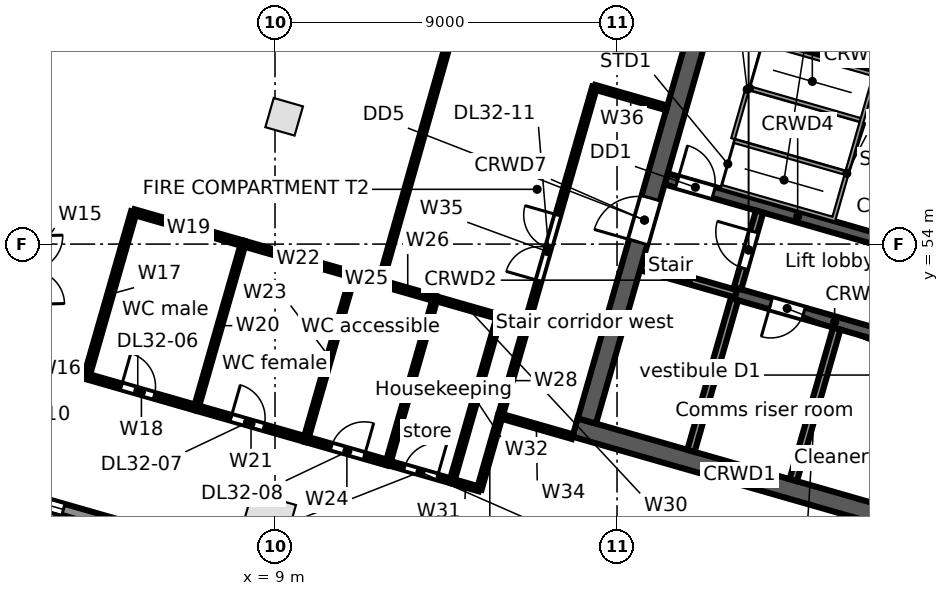
"""IFC4 building model, lengths in metres.
Left out: names, types, materials, properties, quantities, classifications, styles, units other than length and angle.
Written with IfcOpenShell. Run it as: python <this file> out.ifc"""

import sys

from ifc_helpers import new_model, si_unit, direction, frame, frame_2d, origin, origin_2d, place, context, subcontext, project, spatial, rectangle, extrude, element, fill, save


model = new_model("IFC4")
c1 = context("Model", 3, precision=1e-05, world=origin(), true_north=direction((0.0, 1.0)))
c2 = subcontext(c1, "Body", "Model", "MODEL_VIEW")
j1 = project(units=[si_unit("LENGTHUNIT", "METRE"), si_unit("PLANEANGLEUNIT", "RADIAN")], contexts=[c1])
p1 = place(None, origin())
s1 = spatial("IfcSite", under=j1, at=p1, CompositionType="ELEMENT")
p2 = place(p1, origin())
s2 = spatial("IfcBuilding", under=s1, at=p2, CompositionType="ELEMENT")
p3 = place(p2, frame((0.0, 0.0, 158.9)))
s3 = spatial("IfcBuildingStorey", under=s2, at=p3, CompositionType="ELEMENT", Elevation=158.9)
p4 = place(p3, frame((8.81, 46.722, 0.0), z_axis=(0.0, 0.0, 1.0), x_axis=(0.961261695938, -0.275637355817, 0.0)))
e1 = element("IfcColumn", 1, at=p4, inside=s3, PredefinedType="COLUMN", context=c2, shape_type="SweptSolid", body=[
    extrude(rectangle(XDim=1.2, YDim=1.2, at=origin_2d()), origin(), (0.0, 0.0, 1.0), 4.0),
])
p5 = place(p3, frame((9.241, 57.35, 0.0), z_axis=(0.0, 0.0, 1.0), x_axis=(0.961261695938, -0.275637355817, 0.0)))
e2 = element("IfcColumn", 2, at=p5, inside=s3, PredefinedType="COLUMN", context=c2, shape_type="SweptSolid", body=[
    extrude(rectangle(XDim=0.8, YDim=0.8, at=origin_2d()), origin(), (0.0, 0.0, 1.0), 4.0),
])
p6 = place(p3, frame((24.042, 41.106, 0.0), z_axis=(0.0, 0.0, 1.0), x_axis=(-0.961261693976, 0.275637362661, 0.0)))
e3 = element("IfcWall", 3, at=p6, inside=s3, PredefinedType="STANDARD", context=c2, shape_type="SweptSolid", body=[
    extrude(rectangle(XDim=24.948, YDim=0.3, at=frame_2d((12.474, 0.0))), origin(), (0.0, 0.0, 1.0), 3.68),
])
p7 = place(p6, frame((21.441, 0.0, 0.6)))
e4 = element("IfcOpeningElement", 4, at=p7, cuts=e3, PredefinedType="OPENING", context=c2, shape_type="SweptSolid", body=[
    extrude(rectangle(XDim=0.9, YDim=2.4, at=frame_2d((0.45, 1.2))), frame((0.0, 0.16, 0.0), z_axis=(0.0, -1.0, 0.0), x_axis=(1.0, 0.0, 0.0)), (0.0, 0.0, 1.0), 0.32),
])
p8 = place(p6, frame((13.121, 0.0, 0.6)))
e5 = element("IfcOpeningElement", 5, at=p8, cuts=e3, PredefinedType="OPENING", context=c2, shape_type="SweptSolid", body=[
    extrude(rectangle(XDim=0.9, YDim=2.4, at=frame_2d((0.45, 1.2))), frame((0.0, 0.16, 0.0), z_axis=(0.0, -1.0, 0.0), x_axis=(1.0, 0.0, 0.0)), (0.0, 0.0, 1.0), 0.32),
])
p9 = place(p6, frame((10.591, 0.0, 0.0)))
e6 = element("IfcOpeningElement", 6, at=p9, cuts=e3, PredefinedType="OPENING", context=c2, shape_type="SweptSolid", body=[
    extrude(rectangle(XDim=1.8, YDim=2.4, at=frame_2d((0.9, 1.2))), frame((0.0, 0.16, 0.0), z_axis=(0.0, -1.0, 0.0), x_axis=(1.0, 0.0, 0.0)), (0.0, 0.0, 1.0), 0.32),
])
p10 = place(p6, frame((4.8, 0.0, 0.6)))
e7 = element("IfcOpeningElement", 7, at=p10, cuts=e3, PredefinedType="OPENING", context=c2, shape_type="SweptSolid", body=[
    extrude(rectangle(XDim=0.9, YDim=2.4, at=frame_2d((0.45, 1.2))), frame((0.0, 0.16, 0.0), z_axis=(0.0, -1.0, 0.0), x_axis=(1.0, 0.0, 0.0)), (0.0, 0.0, 1.0), 0.32),
])
p11 = place(p6, frame((2.27, 0.0, 0.0)))
e8 = element("IfcOpeningElement", 8, at=p11, cuts=e3, PredefinedType="OPENING", context=c2, shape_type="SweptSolid", body=[
    extrude(rectangle(XDim=1.8, YDim=2.4, at=frame_2d((0.9, 1.2))), frame((0.0, 0.16, 0.0), z_axis=(0.0, -1.0, 0.0), x_axis=(1.0, 0.0, 0.0)), (0.0, 0.0, 1.0), 0.32),
])
p12 = place(p3, frame((16.897, 49.173, 0.0), z_axis=(0.0, 0.0, 1.0), x_axis=(0.96126248289, -0.275634611374, 0.0)))
e9 = element("IfcWall", 9, at=p12, inside=s3, PredefinedType="SOLIDWALL", context=c2, shape_type="SweptSolid", body=[
    extrude(rectangle(XDim=9.0, YDim=0.5, at=frame_2d((4.5, 0.0))), origin(), (0.0, 0.0, 1.0), 3.68),
])
p13 = place(p3, frame((18.632, 53.409, 0.0), z_axis=(0.0, 0.0, 1.0), x_axis=(0.961247078216, -0.275688328772, 0.0)))
e10 = element("IfcWall", 10, at=p13, inside=s3, PredefinedType="SOLIDWALL", context=c2, shape_type="SweptSolid", body=[
    extrude(rectangle(XDim=2.6, YDim=0.2, at=frame_2d((1.3, 0.0))), origin(), (0.0, 0.0, 1.0), 3.68),
])
p14 = place(p3, frame((21.131, 52.692, 0.0), z_axis=(0.0, 0.0, 1.0), x_axis=(0.961271043721, -0.27560475414, 0.0)))
e11 = element("IfcWall", 11, at=p14, inside=s3, PredefinedType="SOLIDWALL", context=c2, shape_type="SweptSolid", body=[
    extrude(rectangle(XDim=5.4, YDim=0.3, at=frame_2d((2.7, 0.0))), origin(), (0.0, 0.0, 1.0), 3.68),
])
p15 = place(p14, frame((0.95, 0.0, 0.0)))
e12 = element("IfcOpeningElement", 12, at=p15, cuts=e11, PredefinedType="OPENING", context=c2, shape_type="SweptSolid", body=[
    extrude(rectangle(XDim=0.9, YDim=2.1, at=frame_2d((0.45, 1.05))), frame((0.0, 0.16, 0.0), z_axis=(0.0, -1.0, 0.0), x_axis=(1.0, 0.0, 0.0)), (0.0, 0.0, 1.0), 0.32),
])
p16 = place(p14, frame((3.75, 0.0, 0.0)))
e13 = element("IfcOpeningElement", 13, at=p16, cuts=e11, PredefinedType="OPENING", context=c2, shape_type="SweptSolid", body=[
    extrude(rectangle(XDim=0.9, YDim=2.1, at=frame_2d((0.45, 1.05))), frame((0.0, 0.16, 0.0), z_axis=(0.0, -1.0, 0.0), x_axis=(1.0, 0.0, 0.0)), (0.0, 0.0, 1.0), 0.32),
])
p17 = place(p3, frame((19.293, 55.716, 0.0), z_axis=(0.0, 0.0, 1.0), x_axis=(0.96125862491, -0.275648065539, 0.0)))
e14 = element("IfcWall", 14, at=p17, inside=s3, PredefinedType="SOLIDWALL", context=c2, shape_type="SweptSolid", body=[
    extrude(rectangle(XDim=7.2, YDim=0.3, at=frame_2d((3.6, 0.0))), origin(), (0.0, 0.0, 1.0), 3.68),
])
p18 = place(p17, frame((0.3, 0.0, 0.0)))
e15 = element("IfcOpeningElement", 15, at=p18, cuts=e14, PredefinedType="OPENING", context=c2, shape_type="SweptSolid", body=[
    extrude(rectangle(XDim=1.0, YDim=2.1, at=frame_2d((0.5, 1.05))), frame((0.0, 0.16, 0.0), z_axis=(0.0, -1.0, 0.0), x_axis=(1.0, 0.0, 0.0)), (0.0, 0.0, 1.0), 0.32),
])
p19 = place(p3, frame((20.067, 60.228, 0.0), z_axis=(0.0, 0.0, 1.0), x_axis=(0.96126248289, -0.275634611374, 0.0)))
e16 = element("IfcWall", 16, at=p19, inside=s3, PredefinedType="SOLIDWALL", context=c2, shape_type="SweptSolid", body=[
    extrude(rectangle(XDim=9.0, YDim=0.5, at=frame_2d((4.5, 0.0))), origin(), (0.0, 0.0, 1.0), 3.68),
])
p20 = place(p3, frame((17.206, 49.344, 0.0), z_axis=(0.0, 0.0, 1.0), x_axis=(0.275632651182, 0.961263044958, 0.0)))
e17 = element("IfcWall", 17, at=p20, inside=s3, PredefinedType="SOLIDWALL", context=c2, shape_type="SweptSolid", body=[
    extrude(rectangle(XDim=11.0, YDim=0.5, at=frame_2d((5.5, 0.0))), origin(), (0.0, 0.0, 1.0), 3.68),
])
p21 = place(p20, frame((4.9, 0.0, 0.0)))
e18 = element("IfcOpeningElement", 18, at=p21, cuts=e17, PredefinedType="OPENING", context=c2, shape_type="SweptSolid", body=[
    extrude(rectangle(XDim=1.2, YDim=2.1, at=frame_2d((0.6, 1.05))), frame((0.0, 0.26, 0.0), z_axis=(0.0, -1.0, 0.0), x_axis=(1.0, 0.0, 0.0)), (0.0, 0.0, 1.0), 0.52),
])
p22 = place(p3, frame((19.946, 48.559, 0.0), z_axis=(0.0, 0.0, 1.0), x_axis=(0.275668905258, 0.961252648721, 0.0)))
e19 = element("IfcWall", 19, at=p22, inside=s3, PredefinedType="SOLIDWALL", context=c2, shape_type="SweptSolid", body=[
    extrude(rectangle(XDim=4.15, YDim=0.2, at=frame_2d((2.075, 0.0))), origin(), (0.0, 0.0, 1.0), 3.68),
])
p23 = place(p3, frame((21.172, 52.837, 0.0), z_axis=(0.0, 0.0, 1.0), x_axis=(0.275657676022, 0.961255868981, 0.0)))
e20 = element("IfcWall", 20, at=p23, inside=s3, PredefinedType="PARTITIONING", context=c2, shape_type="SweptSolid", body=[
    extrude(rectangle(XDim=2.1, YDim=0.2, at=frame_2d((1.05, 0.0))), origin(), (0.0, 0.0, 1.0), 3.68),
])
p24 = place(p23, frame((0.55, 0.0, 0.0)))
e21 = element("IfcOpeningElement", 21, at=p24, cuts=e20, PredefinedType="OPENING", context=c2, shape_type="SweptSolid", body=[
    extrude(rectangle(XDim=1.0, YDim=2.1, at=frame_2d((0.5, 1.05))), frame((0.0, 0.11, 0.0), z_axis=(0.0, -1.0, 0.0), x_axis=(1.0, 0.0, 0.0)), (0.0, 0.0, 1.0), 0.22),
])
p25 = place(p3, frame((22.637, 47.787, 0.0), z_axis=(0.0, 0.0, 1.0), x_axis=(0.275614546295, 0.961268236171, 0.0)))
e22 = element("IfcWall", 22, at=p25, inside=s3, PredefinedType="PARTITIONING", context=c2, shape_type="SweptSolid", body=[
    extrude(rectangle(XDim=4.15, YDim=0.2, at=frame_2d((2.075, 0.0))), origin(), (0.0, 0.0, 1.0), 3.68),
])
p26 = place(p3, frame((2.601, 50.932, 0.0), z_axis=(0.0, 0.0, 1.0), x_axis=(0.961197773994, -0.27586018065, 0.0)))
e23 = element("IfcWall", 23, at=p26, inside=s3, PredefinedType="PARTITIONING", context=c2, shape_type="SweptSolid", body=[
    extrude(rectangle(XDim=1.5, YDim=0.125, at=frame_2d((0.75, 0.0))), origin(), (0.0, 0.0, 1.0), 3.68),
])
p27 = place(p3, frame((4.043, 50.518, 0.0), z_axis=(0.0, 0.0, 1.0), x_axis=(0.275745553681, 0.96123066411, 0.0)))
e24 = element("IfcWall", 24, at=p27, inside=s3, PredefinedType="PARTITIONING", context=c2, shape_type="SweptSolid", body=[
    extrude(rectangle(XDim=4.5, YDim=0.15, at=frame_2d((2.25, 0.0))), origin(), (0.0, 0.0, 1.0), 3.68),
])
p28 = place(p3, frame((4.043, 50.518, 0.0), z_axis=(0.0, 0.0, 1.0), x_axis=(0.961247103494, -0.275688240636, 0.0)))
e25 = element("IfcWall", 25, at=p28, inside=s3, PredefinedType="PARTITIONING", context=c2, shape_type="SweptSolid", body=[
    extrude(rectangle(XDim=3.0, YDim=0.15, at=frame_2d((1.5, 0.0))), origin(), (0.0, 0.0, 1.0), 3.68),
])
p29 = place(p28, frame((0.95, 0.0, 0.0)))
e26 = element("IfcOpeningElement", 26, at=p29, cuts=e25, PredefinedType="OPENING", context=c2, shape_type="SweptSolid", body=[
    extrude(rectangle(XDim=0.9, YDim=2.1, at=frame_2d((0.45, 1.05))), frame((0.0, 0.085, 0.0), z_axis=(0.0, -1.0, 0.0), x_axis=(1.0, 0.0, 0.0)), (0.0, 0.0, 1.0), 0.17),
])
p30 = place(p3, frame((5.284, 54.844, 0.0), z_axis=(0.0, 0.0, 1.0), x_axis=(0.961243927922, -0.275699312717, 0.0)))
e27 = element("IfcWall", 27, at=p30, inside=s3, PredefinedType="PARTITIONING", context=c2, shape_type="SweptSolid", body=[
    extrude(rectangle(XDim=2.999, YDim=0.15, at=frame_2d((1.5, 0.0))), origin(), (0.0, 0.0, 1.0), 3.68),
])
p31 = place(p3, frame((6.927, 49.691, 0.0), z_axis=(0.0, 0.0, 1.0), x_axis=(0.275530671241, 0.961292280841, 0.0)))
e28 = element("IfcWall", 28, at=p31, inside=s3, PredefinedType="PARTITIONING", context=c2, shape_type="SweptSolid", body=[
    extrude(rectangle(XDim=4.5, YDim=0.125, at=frame_2d((2.25, 0.0))), origin(), (0.0, 0.0, 1.0), 3.68),
])
p32 = place(p3, frame((6.927, 49.691, 0.0), z_axis=(0.0, 0.0, 1.0), x_axis=(0.961268664977, -0.27561305073, 0.0)))
e29 = element("IfcWall", 29, at=p32, inside=s3, PredefinedType="PARTITIONING", context=c2, shape_type="SweptSolid", body=[
    extrude(rectangle(XDim=3.0, YDim=0.15, at=frame_2d((1.5, 0.0))), origin(), (0.0, 0.0, 1.0), 2.748),
])
p33 = place(p32, frame((0.95, 0.0, 0.0)))
e30 = element("IfcOpeningElement", 30, at=p33, cuts=e29, PredefinedType="OPENING", context=c2, shape_type="SweptSolid", body=[
    extrude(rectangle(XDim=0.9, YDim=2.1, at=frame_2d((0.45, 1.05))), frame((0.0, 0.085, 0.0), z_axis=(0.0, -1.0, 0.0), x_axis=(1.0, 0.0, 0.0)), (0.0, 0.0, 1.0), 0.17),
])
p34 = place(p3, frame((8.167, 54.017, 0.0), z_axis=(0.0, 0.0, 1.0), x_axis=(0.961247103494, -0.275688240636, 0.0)))
e31 = element("IfcWall", 31, at=p34, inside=s3, PredefinedType="PARTITIONING", context=c2, shape_type="SweptSolid", body=[
    extrude(rectangle(XDim=3.0, YDim=0.15, at=frame_2d((1.5, 0.0))), origin(), (0.0, 0.0, 1.0), 2.748),
])
p35 = place(p3, frame((9.811, 48.864, 0.0), z_axis=(0.0, 0.0, 1.0), x_axis=(0.275545040649, 0.96128816209, 0.0)))
e32 = element("IfcWall", 32, at=p35, inside=s3, PredefinedType="PARTITIONING", context=c2, shape_type="SweptSolid", body=[
    extrude(rectangle(XDim=4.5, YDim=0.125, at=frame_2d((2.25, 0.0))), origin(), (0.0, 0.0, 1.0), 3.68),
])
p36 = place(p3, frame((9.811, 48.864, 0.0), z_axis=(0.0, 0.0, 1.0), x_axis=(0.961236680145, -0.275724581318, 0.0)))
e33 = element("IfcWall", 33, at=p36, inside=s3, PredefinedType="PARTITIONING", context=c2, shape_type="SweptSolid", body=[
    extrude(rectangle(XDim=2.249, YDim=0.15, at=frame_2d((1.125, 0.0))), origin(), (0.0, 0.0, 1.0), 3.68),
])
p37 = place(p36, frame((0.7, 0.0, 0.0)))
e34 = element("IfcOpeningElement", 34, at=p37, cuts=e33, PredefinedType="OPENING", context=c2, shape_type="SweptSolid", body=[
    extrude(rectangle(XDim=0.9, YDim=2.1, at=frame_2d((0.45, 1.05))), frame((0.0, 0.085, 0.0), z_axis=(0.0, -1.0, 0.0), x_axis=(1.0, 0.0, 0.0)), (0.0, 0.0, 1.0), 0.17),
])
p38 = place(p3, frame((11.051, 53.19, 0.0), z_axis=(0.0, 0.0, 1.0), x_axis=(0.961154610169, -0.276010534854, 0.0)))
e35 = element("IfcWall", 35, at=p38, inside=s3, PredefinedType="PARTITIONING", context=c2, shape_type="SweptSolid", body=[
    extrude(rectangle(XDim=0.75, YDim=0.15, at=frame_2d((0.375, 0.0))), origin(), (0.0, 0.0, 1.0), 3.68),
])
p39 = place(p3, frame((11.772, 52.983, 0.0), z_axis=(0.0, 0.0, 1.0), x_axis=(0.961382563126, -0.275215492508, 0.0)))
e36 = element("IfcWall", 36, at=p39, inside=s3, PredefinedType="PARTITIONING", context=c2, shape_type="SweptSolid", body=[
    extrude(rectangle(XDim=1.5, YDim=0.15, at=frame_2d((0.75, 0.0))), origin(), (0.0, 0.0, 1.0), 3.68),
])
p40 = place(p3, frame((11.772, 52.983, 0.0), z_axis=(0.0, 0.0, 1.0), x_axis=(0.272554241659, 0.96214041873, 0.0)))
e37 = element("IfcWall", 37, at=p40, inside=s3, PredefinedType="PARTITIONING", context=c2, shape_type="SweptSolid", body=[
    extrude(rectangle(XDim=14.885, YDim=0.125, at=frame_2d((7.443, 0.0))), origin(), (0.0, 0.0, 1.0), 2.748),
])
p41 = place(p3, frame((11.973, 48.244, 0.0), z_axis=(0.0, 0.0, 1.0), x_axis=(0.275781295989, 0.961220410095, 0.0)))
e38 = element("IfcWall", 38, at=p41, inside=s3, PredefinedType="PARTITIONING", context=c2, shape_type="SweptSolid", body=[
    extrude(rectangle(XDim=4.501, YDim=0.125, at=frame_2d((2.25, 0.0))), origin(), (0.0, 0.0, 1.0), 3.68),
])
p42 = place(p3, frame((11.973, 48.244, 0.0), z_axis=(0.0, 0.0, 1.0), x_axis=(0.96136592135, -0.275273618907, 0.0)))
e39 = element("IfcWall", 39, at=p42, inside=s3, PredefinedType="PARTITIONING", context=c2, shape_type="SweptSolid", body=[
    extrude(rectangle(XDim=1.751, YDim=0.125, at=frame_2d((0.875, 0.0))), origin(), (0.0, 0.0, 1.0), 3.68),
])
p43 = place(p42, frame((0.45, 0.0, 0.0)))
e40 = element("IfcOpeningElement", 40, at=p43, cuts=e39, PredefinedType="OPENING", context=c2, shape_type="SweptSolid", body=[
    extrude(rectangle(XDim=0.9, YDim=2.1, at=frame_2d((0.45, 1.05))), frame((0.0, 0.073, 0.0), z_axis=(0.0, -1.0, 0.0), x_axis=(1.0, 0.0, 0.0)), (0.0, 0.0, 1.0), 0.145),
])
p44 = place(p3, frame((13.214, 52.57, 0.0), z_axis=(0.0, 0.0, 1.0), x_axis=(0.961276075309, -0.275587204055, 0.0)))
e41 = element("IfcWall", 41, at=p44, inside=s3, PredefinedType="PARTITIONING", context=c2, shape_type="SweptSolid", body=[
    extrude(rectangle(XDim=1.75, YDim=0.125, at=frame_2d((0.875, 0.0))), origin(), (0.0, 0.0, 1.0), 3.68),
])
p45 = place(p3, frame((13.656, 47.762, 0.0), z_axis=(0.0, 0.0, 1.0), x_axis=(0.961154610169, -0.276010534854, 0.0)))
e42 = element("IfcWall", 42, at=p45, inside=s3, PredefinedType="PARTITIONING", context=c2, shape_type="SweptSolid", body=[
    extrude(rectangle(XDim=0.75, YDim=0.125, at=frame_2d((0.375, 0.0))), origin(), (0.0, 0.0, 1.0), 3.68),
])
p46 = place(p3, frame((13.656, 47.762, 0.0), z_axis=(0.0, 0.0, 1.0), x_axis=(0.275545040649, 0.96128816209, 0.0)))
e43 = element("IfcWall", 43, at=p46, inside=s3, PredefinedType="PARTITIONING", context=c2, shape_type="SweptSolid", body=[
    extrude(rectangle(XDim=4.5, YDim=0.125, at=frame_2d((2.25, 0.0))), origin(), (0.0, 0.0, 1.0), 3.68),
])
p47 = place(p3, frame((14.377, 47.555, 0.0), z_axis=(0.0, 0.0, 1.0), x_axis=(0.275446387355, 0.961316434736, 0.0)))
e44 = element("IfcWall", 44, at=p47, inside=s3, PredefinedType="PARTITIONING", context=c2, shape_type="SweptSolid", body=[
    extrude(rectangle(XDim=2.0, YDim=0.125, at=frame_2d((1.0, 0.0))), origin(), (0.0, 0.0, 1.0), 3.68),
])
p48 = place(p3, frame((14.928, 49.478, 0.0), z_axis=(0.0, 0.0, 1.0), x_axis=(0.961243778232, -0.27569983462, 0.0)))
e45 = element("IfcWall", 45, at=p48, inside=s3, PredefinedType="PARTITIONING", context=c2, shape_type="SweptSolid", body=[
    extrude(rectangle(XDim=1.977, YDim=0.125, at=frame_2d((0.988, 0.0))), origin(), (0.0, 0.0, 1.0), 3.68),
])
p49 = place(p3, frame((14.928, 49.478, 0.0), z_axis=(0.0, 0.0, 1.0), x_axis=(0.275674053528, 0.961251172281, 0.0)))
e46 = element("IfcWall", 46, at=p49, inside=s3, PredefinedType="PARTITIONING", context=c2, shape_type="SweptSolid", body=[
    extrude(rectangle(XDim=9.0, YDim=0.125, at=frame_2d((4.5, 0.0))), origin(), (0.0, 0.0, 1.0), 2.748),
])
p50 = place(p49, frame((3.7, 0.0, 0.0)))
e47 = element("IfcOpeningElement", 47, at=p50, cuts=e46, PredefinedType="OPENING", context=c2, shape_type="SweptSolid", body=[
    extrude(rectangle(XDim=1.8, YDim=2.1, at=frame_2d((0.9, 1.05))), frame((0.0, 0.073, 0.0), z_axis=(0.0, -1.0, 0.0), x_axis=(1.0, 0.0, 0.0)), (0.0, 0.0, 1.0), 0.145),
])
p51 = place(p3, frame((17.409, 58.129, 0.0), z_axis=(0.0, 0.0, 1.0), x_axis=(0.961253165474, -0.275667103345, 0.0)))
e48 = element("IfcWall", 48, at=p51, inside=s3, PredefinedType="PARTITIONING", context=c2, shape_type="SweptSolid", body=[
    extrude(rectangle(XDim=1.977, YDim=0.125, at=frame_2d((0.988, 0.0))), origin(), (0.0, 0.0, 1.0), 3.68),
])
p52 = place(p7, origin())
e49 = element("IfcWindow", 49, at=p52, inside=s3, PartitioningType="SINGLE_PANEL", PredefinedType="WINDOW", context=c2, shape_type="SweptSolid", body=[
    extrude(rectangle(XDim=0.9, YDim=2.4, at=frame_2d((0.45, 1.2))), frame((0.0, 0.03, 0.0), z_axis=(0.0, -1.0, 0.0), x_axis=(1.0, 0.0, 0.0)), (0.0, 0.0, 1.0), 0.06),
])
fill(e4, e49)
p53 = place(p18, origin())
e50 = element("IfcDoor", 50, at=p53, inside=s3, OperationType="SINGLE_SWING_LEFT", PredefinedType="DOOR", context=c2, shape_type="SweptSolid", body=[
    extrude(rectangle(XDim=1.0, YDim=2.1, at=frame_2d((0.5, 1.05))), frame((0.0, 0.025, 0.0), z_axis=(0.0, -1.0, 0.0), x_axis=(1.0, 0.0, 0.0)), (0.0, 0.0, 1.0), 0.05),
])
fill(e15, e50)
p54 = place(p24, origin())
e51 = element("IfcDoor", 51, at=p54, inside=s3, OperationType="SINGLE_SWING_RIGHT", PredefinedType="DOOR", context=c2, shape_type="SweptSolid", body=[
    extrude(rectangle(XDim=1.0, YDim=2.1, at=frame_2d((0.5, 1.05))), frame((0.0, 0.025, 0.0), z_axis=(0.0, -1.0, 0.0), x_axis=(1.0, 0.0, 0.0)), (0.0, 0.0, 1.0), 0.05),
])
fill(e21, e51)
p55 = place(p21, origin())
e52 = element("IfcDoor", 52, at=p55, inside=s3, OperationType="SINGLE_SWING_LEFT", PredefinedType="DOOR", context=c2, shape_type="SweptSolid", body=[
    extrude(rectangle(XDim=1.2, YDim=2.1, at=frame_2d((0.6, 1.05))), frame((0.0, 0.025, 0.0), z_axis=(0.0, -1.0, 0.0), x_axis=(1.0, 0.0, 0.0)), (0.0, 0.0, 1.0), 0.05),
])
fill(e18, e52)
p56 = place(p15, frame((0.9, 0.0, 0.0), z_axis=(0.0, 0.0, 1.0), x_axis=(-1.0, 0.0, 0.0)))
e53 = element("IfcDoor", 53, at=p56, inside=s3, OperationType="SINGLE_SWING_RIGHT", PredefinedType="DOOR", context=c2, shape_type="SweptSolid", body=[
    extrude(rectangle(XDim=0.9, YDim=2.1, at=frame_2d((0.45, 1.05))), frame((0.0, 0.025, 0.0), z_axis=(0.0, -1.0, 0.0), x_axis=(1.0, 0.0, 0.0)), (0.0, 0.0, 1.0), 0.05),
])
fill(e12, e53)
p57 = place(p29, origin())
e54 = element("IfcDoor", 54, at=p57, inside=s3, OperationType="SINGLE_SWING_LEFT", PredefinedType="DOOR", context=c2, shape_type="SweptSolid", body=[
    extrude(rectangle(XDim=0.9, YDim=2.1, at=frame_2d((0.45, 1.05))), frame((0.0, 0.025, 0.0), z_axis=(0.0, -1.0, 0.0), x_axis=(1.0, 0.0, 0.0)), (0.0, 0.0, 1.0), 0.05),
])
fill(e26, e54)
p58 = place(p33, origin())
e55 = element("IfcDoor", 55, at=p58, inside=s3, OperationType="SINGLE_SWING_LEFT", PredefinedType="DOOR", context=c2, shape_type="SweptSolid", body=[
    extrude(rectangle(XDim=0.9, YDim=2.1, at=frame_2d((0.45, 1.05))), frame((0.0, 0.025, 0.0), z_axis=(0.0, -1.0, 0.0), x_axis=(1.0, 0.0, 0.0)), (0.0, 0.0, 1.0), 0.05),
])
fill(e30, e55)
p59 = place(p37, origin())
e56 = element("IfcDoor", 56, at=p59, inside=s3, OperationType="SINGLE_SWING_RIGHT", PredefinedType="DOOR", context=c2, shape_type="SweptSolid", body=[
    extrude(rectangle(XDim=0.9, YDim=2.1, at=frame_2d((0.45, 1.05))), frame((0.0, 0.025, 0.0), z_axis=(0.0, -1.0, 0.0), x_axis=(1.0, 0.0, 0.0)), (0.0, 0.0, 1.0), 0.05),
])
fill(e34, e56)
p60 = place(p43, origin())
e57 = element("IfcDoor", 57, at=p60, inside=s3, OperationType="SINGLE_SWING_RIGHT", PredefinedType="DOOR", context=c2, shape_type="SweptSolid", body=[
    extrude(rectangle(XDim=0.9, YDim=2.1, at=frame_2d((0.45, 1.05))), frame((0.0, 0.025, 0.0), z_axis=(0.0, -1.0, 0.0), x_axis=(1.0, 0.0, 0.0)), (0.0, 0.0, 1.0), 0.05),
])
fill(e40, e57)
p61 = place(p50, origin())
e58 = element("IfcDoor", 58, at=p61, inside=s3, OperationType="DOUBLE_DOOR_SINGLE_SWING", PredefinedType="DOOR", context=c2, shape_type="SweptSolid", body=[
    extrude(rectangle(XDim=1.8, YDim=2.1, at=frame_2d((0.9, 1.05))), frame((0.0, 0.025, 0.0), z_axis=(0.0, -1.0, 0.0), x_axis=(1.0, 0.0, 0.0)), (0.0, 0.0, 1.0), 0.05),
])
fill(e47, e58)
save(model, sys.argv[1])
